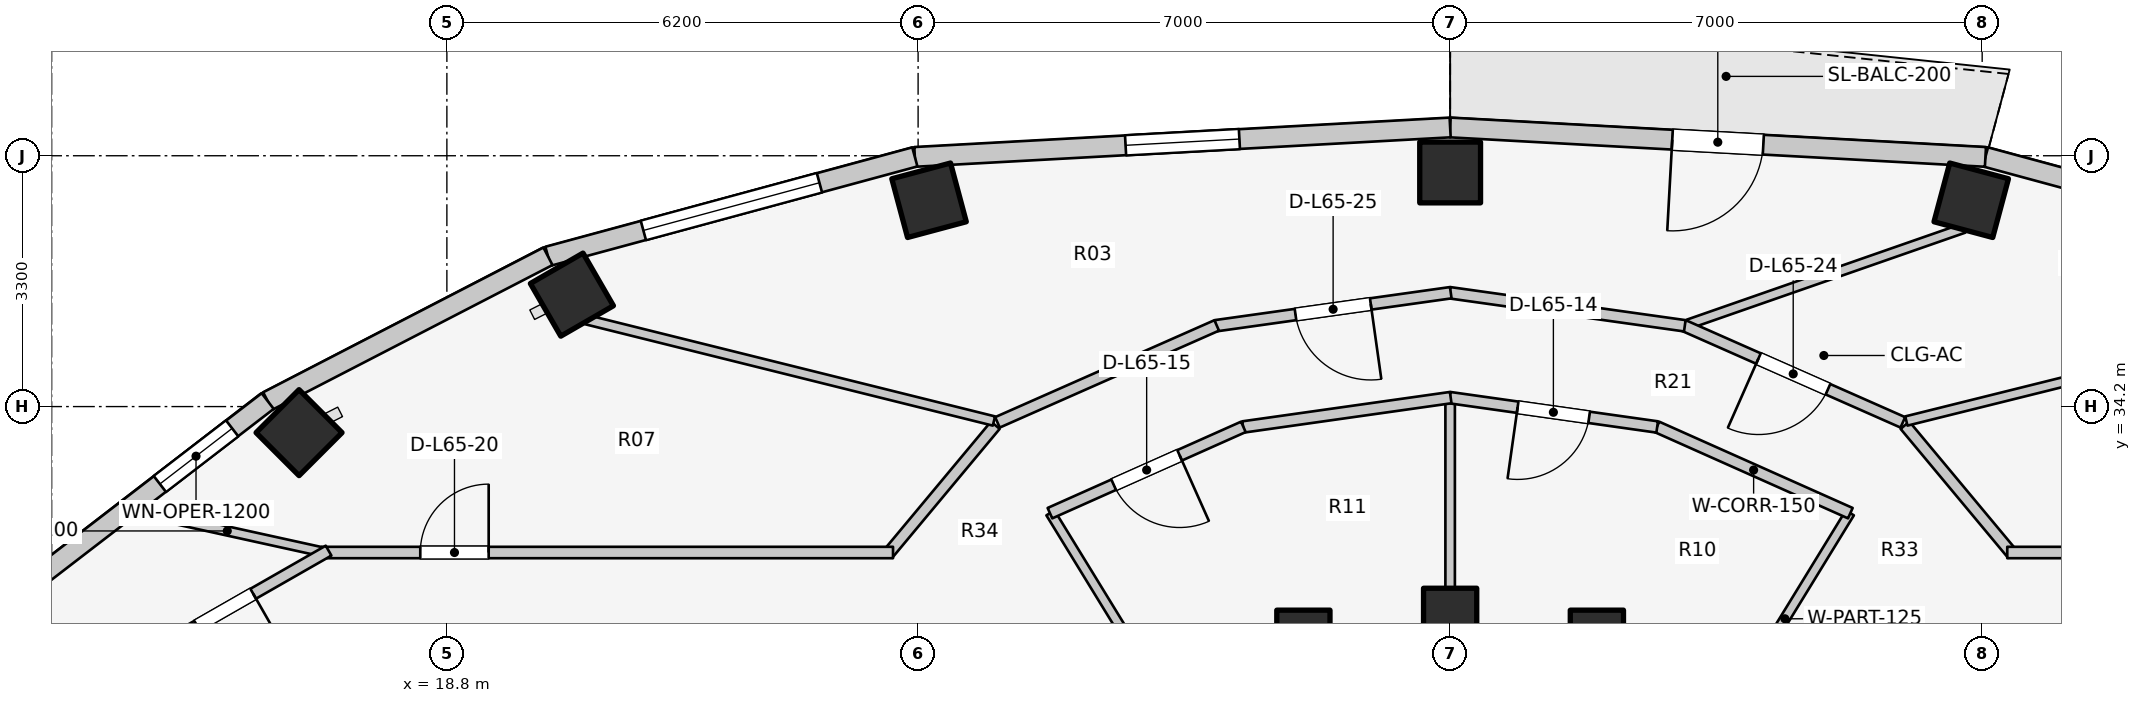
"""IFC4 building model, lengths in metres.
Left out: names, types, materials, properties, quantities, classifications, styles, units other than length and angle.
Written with IfcOpenShell. Run it as: python <this file> out.ifc"""

import sys

from ifc_helpers import new_model, si_unit, direction, frame, frame_2d, origin, origin_2d, place, context, subcontext, project, spatial, rectangle, extrude, element, fill, save


model = new_model("IFC4")
c1 = context("Model", 3, precision=1e-05, world=origin(), true_north=direction((0.0, 1.0)))
c2 = subcontext(c1, "Body", "Model", "MODEL_VIEW")
j1 = project(units=[si_unit("LENGTHUNIT", "METRE"), si_unit("PLANEANGLEUNIT", "RADIAN")], contexts=[c1])
p1 = place(None, origin())
s1 = spatial("IfcSite", under=j1, at=p1, CompositionType="ELEMENT")
p2 = place(p1, origin())
s2 = spatial("IfcBuilding", under=s1, at=p2, CompositionType="ELEMENT")
p3 = place(p2, frame((0.0, 0.0, 214.0)))
s3 = spatial("IfcBuildingStorey", under=s2, at=p3, CompositionType="ELEMENT", Elevation=214.0)
p4 = place(p3, frame((33.931, 31.172, 0.0), z_axis=(0.0, 0.0, 1.0), x_axis=(1.0, 0.0, 0.0)))
e1 = element("IfcColumn", 1, at=p4, inside=s3, PredefinedType="COLUMN", context=c2, shape_type="SweptSolid", body=[
    extrude(rectangle(XDim=0.7, YDim=0.7, at=origin_2d()), origin(), (0.0, 0.0, 1.0), 3.1),
])
p5 = place(p3, frame((38.856, 36.914, 0.0), z_axis=(0.0, 0.0, 1.0), x_axis=(0.258819045103, 0.965925826289, 0.0)))
e2 = element("IfcColumn", 2, at=p5, inside=s3, PredefinedType="COLUMN", context=c2, shape_type="SweptSolid", body=[
    extrude(rectangle(XDim=0.8, YDim=0.8, at=origin_2d()), origin(), (0.0, 0.0, 1.0), 3.1),
])
p6 = place(p3, frame((32.0, 31.46, 0.0), z_axis=(0.0, 0.0, 1.0), x_axis=(1.0, 0.0, 0.0)))
e3 = element("IfcColumn", 3, at=p6, inside=s3, PredefinedType="COLUMN", context=c2, shape_type="SweptSolid", body=[
    extrude(rectangle(XDim=0.7, YDim=0.7, at=origin_2d()), origin(), (0.0, 0.0, 1.0), 3.1),
])
p7 = place(p3, frame((32.0, 37.28, 0.0), z_axis=(0.0, 0.0, 1.0), x_axis=(0.0, 1.0, 0.0)))
e4 = element("IfcColumn", 4, at=p7, inside=s3, PredefinedType="COLUMN", context=c2, shape_type="SweptSolid", body=[
    extrude(rectangle(XDim=0.8, YDim=0.8, at=origin_2d()), origin(), (0.0, 0.0, 1.0), 3.1),
])
p8 = place(p3, frame((30.069, 31.172, 0.0), z_axis=(0.0, 0.0, 1.0), x_axis=(1.0, 0.0, 0.0)))
e5 = element("IfcColumn", 5, at=p8, inside=s3, PredefinedType="COLUMN", context=c2, shape_type="SweptSolid", body=[
    extrude(rectangle(XDim=0.7, YDim=0.7, at=origin_2d()), origin(), (0.0, 0.0, 1.0), 3.1),
])
for number, where, z_axis, x_axis in (
    (6, (25.144, 36.914, 0.0), (0.0, 0.0, 1.0), (-0.259, 0.966, 0.0)),
    (7, (20.445, 35.673, 0.0), (0.0, 0.0, 1.0), (-0.5, 0.866, 0.0)),
    (8, (16.855, 33.857, 0.0), (0.0, 0.0, 1.0), (-0.707, 0.707, 0.0)),
):
    element("IfcColumn", number, at=place(p3, frame(where, z_axis=z_axis, x_axis=x_axis)), inside=s3, PredefinedType="COLUMN", context=c2, shape_type="SweptSolid", body=[
        extrude(rectangle(XDim=0.8, YDim=0.8, at=origin_2d()), origin(), (0.0, 0.0, 1.0), 3.1),
    ])
p9 = place(p3, frame((43.87, 36.177, 0.0), z_axis=(0.0, 0.0, 1.0), x_axis=(-0.965213026382, 0.261464746576, 0.0)))
e9 = element("IfcWall", 9, at=p9, inside=s3, PredefinedType="STANDARD", context=c2, shape_type="SweptSolid", body=[
    extrude(rectangle(XDim=5.001, YDim=0.26, at=frame_2d((2.5, 0.0))), origin(), (0.0, 0.0, 1.0), 2.85),
])
p10 = place(p9, frame((1.301, 0.0, 0.75)))
e10 = element("IfcOpeningElement", 10, at=p10, cuts=e9, PredefinedType="OPENING", context=c2, shape_type="SweptSolid", body=[
    extrude(rectangle(XDim=2.4, YDim=1.7, at=frame_2d((1.2, 0.85))), frame((0.0, 0.14, 0.0), z_axis=(0.0, -1.0, 0.0), x_axis=(1.0, 0.0, 0.0)), (0.0, 0.0, 1.0), 0.28),
])
p11 = place(p3, frame((39.043, 37.485, 0.0), z_axis=(0.0, 0.0, 1.0), x_axis=(-0.998490239527, 0.054929423535, 0.0)))
e11 = element("IfcWall", 11, at=p11, inside=s3, PredefinedType="STANDARD", context=c2, shape_type="SweptSolid", body=[
    extrude(rectangle(XDim=7.054, YDim=0.26, at=frame_2d((3.527, 0.0))), origin(), (0.0, 0.0, 1.0), 2.88),
])
p12 = place(p11, frame((2.927, 0.0, 0.0)))
e12 = element("IfcOpeningElement", 12, at=p12, cuts=e11, PredefinedType="OPENING", context=c2, shape_type="SweptSolid", body=[
    extrude(rectangle(XDim=1.2, YDim=2.2, at=frame_2d((0.6, 1.1))), frame((0.0, 0.14, 0.0), z_axis=(0.0, -1.0, 0.0), x_axis=(1.0, 0.0, 0.0)), (0.0, 0.0, 1.0), 0.28),
])
p13 = place(p3, frame((32.0, 37.872, 0.0), z_axis=(0.0, 0.0, 1.0), x_axis=(-0.998490239527, -0.054929423535, 0.0)))
e13 = element("IfcWall", 13, at=p13, inside=s3, PredefinedType="STANDARD", context=c2, shape_type="SweptSolid", body=[
    extrude(rectangle(XDim=7.054, YDim=0.26, at=frame_2d((3.527, 0.0))), origin(), (0.0, 0.0, 1.0), 2.85),
])
p14 = place(p13, frame((2.777, 0.0, 0.75)))
e14 = element("IfcOpeningElement", 14, at=p14, cuts=e13, PredefinedType="OPENING", context=c2, shape_type="SweptSolid", body=[
    extrude(rectangle(XDim=1.5, YDim=1.6, at=frame_2d((0.75, 0.8))), frame((0.0, 0.14, 0.0), z_axis=(0.0, -1.0, 0.0), x_axis=(1.0, 0.0, 0.0)), (0.0, 0.0, 1.0), 0.28),
])
p15 = place(p3, frame((24.957, 37.485, 0.0), z_axis=(0.0, 0.0, 1.0), x_axis=(-0.965213026382, -0.261464746576, 0.0)))
e15 = element("IfcWall", 15, at=p15, inside=s3, PredefinedType="STANDARD", context=c2, shape_type="SweptSolid", body=[
    extrude(rectangle(XDim=5.001, YDim=0.26, at=frame_2d((2.5, 0.0))), origin(), (0.0, 0.0, 1.0), 2.85),
])
p16 = place(p15, frame((1.301, 0.0, 0.75)))
e16 = element("IfcOpeningElement", 16, at=p16, cuts=e15, PredefinedType="OPENING", context=c2, shape_type="SweptSolid", body=[
    extrude(rectangle(XDim=2.4, YDim=1.7, at=frame_2d((1.2, 0.85))), frame((0.0, 0.14, 0.0), z_axis=(0.0, -1.0, 0.0), x_axis=(1.0, 0.0, 0.0)), (0.0, 0.0, 1.0), 0.28),
])
p17 = place(p3, frame((20.13, 36.177, 0.0), z_axis=(0.0, 0.0, 1.0), x_axis=(-0.88849146803, -0.458893137057, 0.0)))
e17 = element("IfcWall", 17, at=p17, inside=s3, PredefinedType="STANDARD", context=c2, shape_type="SweptSolid", body=[
    extrude(rectangle(XDim=4.15, YDim=0.26, at=frame_2d((2.075, 0.0))), origin(), (0.0, 0.0, 1.0), 2.85),
])
p18 = place(p3, frame((16.442, 34.272, 0.0), z_axis=(0.0, 0.0, 1.0), x_axis=(-0.792713817907, -0.609593965603, 0.0)))
e18 = element("IfcWall", 18, at=p18, inside=s3, PredefinedType="STANDARD", context=c2, shape_type="SweptSolid", body=[
    extrude(rectangle(XDim=4.041, YDim=0.26, at=frame_2d((2.021, 0.0))), origin(), (0.0, 0.0, 1.0), 2.85),
])
p19 = place(p18, frame((0.589, 0.0, 0.75)))
e19 = element("IfcOpeningElement", 19, at=p19, cuts=e18, PredefinedType="OPENING", context=c2, shape_type="SweptSolid", body=[
    extrude(rectangle(XDim=1.2, YDim=1.5, at=frame_2d((0.6, 0.75))), frame((0.0, 0.14, 0.0), z_axis=(0.0, -1.0, 0.0), x_axis=(1.0, 0.0, 0.0)), (0.0, 0.0, 1.0), 0.28),
])
p20 = place(p3, frame((35.55, 30.015, 0.0), z_axis=(0.0, 0.0, 1.0), x_axis=(0.522763432117, 0.852477796802, 0.0)))
e20 = element("IfcWall", 20, at=p20, inside=s3, PredefinedType="PARTITIONING", context=c2, shape_type="SweptSolid", body=[
    extrude(rectangle(XDim=3.269, YDim=0.125, at=frame_2d((1.635, 0.0))), origin(), (0.0, 0.0, 1.0), 2.376),
])
p21 = place(p3, frame((32.0, 31.1, 0.0), z_axis=(0.0, 0.0, 1.0), x_axis=(0.0, 1.0, 0.0)))
e21 = element("IfcWall", 21, at=p21, inside=s3, PredefinedType="PARTITIONING", context=c2, shape_type="SweptSolid", body=[
    extrude(rectangle(XDim=3.218, YDim=0.125, at=frame_2d((1.609, 0.0))), origin(), (0.0, 0.0, 1.0), 2.376),
])
p22 = place(p3, frame((28.45, 30.015, 0.0), z_axis=(0.0, 0.0, 1.0), x_axis=(-0.522763432117, 0.852477796802, 0.0)))
e22 = element("IfcWall", 22, at=p22, inside=s3, PredefinedType="PARTITIONING", context=c2, shape_type="SweptSolid", body=[
    extrude(rectangle(XDim=3.269, YDim=0.125, at=frame_2d((1.635, 0.0))), origin(), (0.0, 0.0, 1.0), 2.376),
])
p23 = place(p3, frame((37.265, 32.798, 0.0), z_axis=(0.0, 0.0, 1.0), x_axis=(-0.913254317828, 0.407389924971, 0.0)))
e23 = element("IfcWall", 23, at=p23, inside=s3, PredefinedType="PARTITIONING", context=c2, shape_type="SweptSolid", body=[
    extrude(rectangle(XDim=2.787, YDim=0.15, at=frame_2d((1.393, 0.0))), origin(), (0.0, 0.0, 1.0), 2.376),
])
p24 = place(p3, frame((34.724, 33.932, 0.0), z_axis=(0.0, 0.0, 1.0), x_axis=(-0.990150268487, 0.140008734782, 0.0)))
e24 = element("IfcWall", 24, at=p24, inside=s3, PredefinedType="PARTITIONING", context=c2, shape_type="SweptSolid", body=[
    extrude(rectangle(XDim=2.759, YDim=0.15, at=frame_2d((1.379, 0.0))), origin(), (0.0, 0.0, 1.0), 2.376),
])
p25 = place(p24, frame((0.904, 0.0, 0.0)))
e25 = element("IfcOpeningElement", 25, at=p25, cuts=e24, PredefinedType="OPENING", context=c2, shape_type="SweptSolid", body=[
    extrude(rectangle(XDim=0.95, YDim=2.1, at=frame_2d((0.475, 1.05))), frame((0.0, 0.085, 0.0), z_axis=(0.0, -1.0, 0.0), x_axis=(1.0, 0.0, 0.0)), (0.0, 0.0, 1.0), 0.17),
])
p26 = place(p3, frame((32.007, 34.318, 0.0), z_axis=(0.0, 0.0, 1.0), x_axis=(-0.990150268487, -0.140008734782, 0.0)))
e26 = element("IfcWall", 26, at=p26, inside=s3, PredefinedType="PARTITIONING", context=c2, shape_type="SweptSolid", body=[
    extrude(rectangle(XDim=2.759, YDim=0.15, at=frame_2d((1.379, 0.0))), origin(), (0.0, 0.0, 1.0), 2.376),
])
p27 = place(p3, frame((29.28, 33.933, 0.0), z_axis=(0.0, 0.0, 1.0), x_axis=(-0.913254317828, -0.407389924971, 0.0)))
e27 = element("IfcWall", 27, at=p27, inside=s3, PredefinedType="PARTITIONING", context=c2, shape_type="SweptSolid", body=[
    extrude(rectangle(XDim=2.787, YDim=0.15, at=frame_2d((1.393, 0.0))), origin(), (0.0, 0.0, 1.0), 2.376),
])
p28 = place(p27, frame((0.918, 0.0, 0.0)))
e28 = element("IfcOpeningElement", 28, at=p28, cuts=e27, PredefinedType="OPENING", context=c2, shape_type="SweptSolid", body=[
    extrude(rectangle(XDim=0.95, YDim=2.1, at=frame_2d((0.475, 1.05))), frame((0.0, 0.085, 0.0), z_axis=(0.0, -1.0, 0.0), x_axis=(1.0, 0.0, 0.0)), (0.0, 0.0, 1.0), 0.17),
])
p29 = place(p3, frame((37.984, 33.955, 0.0), z_axis=(0.0, 0.0, 1.0), x_axis=(0.64030392053, -0.76812166312, 0.0)))
e29 = element("IfcWall", 29, at=p29, inside=s3, PredefinedType="PARTITIONING", context=c2, shape_type="SweptSolid", body=[
    extrude(rectangle(XDim=2.21, YDim=0.15, at=frame_2d((1.105, 0.0))), origin(), (0.0, 0.0, 1.0), 2.376),
])
p30 = place(p3, frame((39.33, 32.28, 0.0), z_axis=(0.0, 0.0, 1.0), x_axis=(1.0, 0.0, 0.0)))
e30 = element("IfcWall", 30, at=p30, inside=s3, PredefinedType="PARTITIONING", context=c2, shape_type="SweptSolid", body=[
    extrude(rectangle(XDim=7.52, YDim=0.15, at=frame_2d((3.76, 0.0))), origin(), (0.0, 0.0, 1.0), 2.376),
])
p31 = place(p30, frame((5.22, 0.0, 0.0)))
e31 = element("IfcOpeningElement", 31, at=p31, cuts=e30, PredefinedType="OPENING", context=c2, shape_type="SweptSolid", body=[
    extrude(rectangle(XDim=0.9, YDim=2.1, at=frame_2d((0.45, 1.05))), frame((0.0, 0.085, 0.0), z_axis=(0.0, -1.0, 0.0), x_axis=(1.0, 0.0, 0.0)), (0.0, 0.0, 1.0), 0.17),
])
p32 = place(p3, frame((17.249, 32.269, 0.0), z_axis=(0.0, 0.0, 1.0), x_axis=(-0.976641849477, 0.214873678823, 0.0)))
e32 = element("IfcWall", 32, at=p32, inside=s3, PredefinedType="MOVABLE", context=c2, shape_type="SweptSolid", body=[
    extrude(rectangle(XDim=2.74, YDim=0.12, at=frame_2d((1.37, 0.0))), origin(), (0.0, 0.0, 1.0), 2.22),
])
p33 = place(p3, frame((26.016, 33.955, 0.0), z_axis=(0.0, 0.0, 1.0), x_axis=(-0.64030392053, -0.76812166312, 0.0)))
e33 = element("IfcWall", 33, at=p33, inside=s3, PredefinedType="PARTITIONING", context=c2, shape_type="SweptSolid", body=[
    extrude(rectangle(XDim=2.21, YDim=0.15, at=frame_2d((1.105, 0.0))), origin(), (0.0, 0.0, 1.0), 2.376),
])
p34 = place(p3, frame((17.15, 32.28, 0.0), z_axis=(0.0, 0.0, 1.0), x_axis=(1.0, 0.0, 0.0)))
e34 = element("IfcWall", 34, at=p34, inside=s3, PredefinedType="PARTITIONING", context=c2, shape_type="SweptSolid", body=[
    extrude(rectangle(XDim=7.52, YDim=0.15, at=frame_2d((3.76, 0.0))), origin(), (0.0, 0.0, 1.0), 2.376),
])
p35 = place(p34, frame((1.3, 0.0, 0.0)))
e35 = element("IfcOpeningElement", 35, at=p35, cuts=e34, PredefinedType="OPENING", context=c2, shape_type="SweptSolid", body=[
    extrude(rectangle(XDim=0.9, YDim=2.1, at=frame_2d((0.45, 1.05))), frame((0.0, 0.085, 0.0), z_axis=(0.0, -1.0, 0.0), x_axis=(1.0, 0.0, 0.0)), (0.0, 0.0, 1.0), 0.17),
])
p36 = place(p3, frame((17.243, 32.305, 0.0), z_axis=(0.0, 0.0, 1.0), x_axis=(-0.867991349648, -0.496579315857, 0.0)))
e36 = element("IfcWall", 36, at=p36, inside=s3, PredefinedType="PARTITIONING", context=c2, shape_type="SweptSolid", body=[
    extrude(rectangle(XDim=2.567, YDim=0.15, at=frame_2d((1.283, 0.0))), origin(), (0.0, 0.0, 1.0), 2.22),
])
p37 = place(p36, frame((1.143, 0.0, 0.0)))
e37 = element("IfcOpeningElement", 37, at=p37, cuts=e36, PredefinedType="OPENING", context=c2, shape_type="SweptSolid", body=[
    extrude(rectangle(XDim=0.85, YDim=2.05, at=frame_2d((0.425, 1.025))), frame((0.0, 0.085, 0.0), z_axis=(0.0, -1.0, 0.0), x_axis=(1.0, 0.0, 0.0)), (0.0, 0.0, 1.0), 0.17),
])
p38 = place(p3, frame((38.002, 34.01, 0.0), z_axis=(0.0, 0.0, 1.0), x_axis=(0.970445810114, 0.241319144769, 0.0)))
e38 = element("IfcWall", 38, at=p38, inside=s3, PredefinedType="PARTITIONING", context=c2, shape_type="SweptSolid", body=[
    extrude(rectangle(XDim=5.526, YDim=0.125, at=frame_2d((2.763, 0.0))), origin(), (0.0, 0.0, 1.0), 2.376),
])
p39 = place(p3, frame((35.131, 35.283, 0.0), z_axis=(0.0, 0.0, 1.0), x_axis=(0.944311395416, 0.329053169697, 0.0)))
e39 = element("IfcWall", 39, at=p39, inside=s3, PredefinedType="PARTITIONING", context=c2, shape_type="SweptSolid", body=[
    extrude(rectangle(XDim=3.84, YDim=0.125, at=frame_2d((1.92, 0.0))), origin(), (0.0, 0.0, 1.0), 2.376),
])
p40 = place(p3, frame((25.998, 34.01, 0.0), z_axis=(0.0, 0.0, 1.0), x_axis=(-0.970445810114, 0.241319144769, 0.0)))
e40 = element("IfcWall", 40, at=p40, inside=s3, PredefinedType="PARTITIONING", context=c2, shape_type="SweptSolid", body=[
    extrude(rectangle(XDim=5.526, YDim=0.125, at=frame_2d((2.763, 0.0))), origin(), (0.0, 0.0, 1.0), 2.376),
])
p41 = place(p3, frame((37.956, 33.992, 0.0), z_axis=(0.0, 0.0, 1.0), x_axis=(-0.914642679993, 0.404263240891, 0.0)))
e41 = element("IfcWall", 41, at=p41, inside=s3, PredefinedType="PARTITIONING", context=c2, shape_type="SweptSolid", body=[
    extrude(rectangle(XDim=3.154, YDim=0.15, at=frame_2d((1.577, 0.0))), origin(), (0.0, 0.0, 1.0), 2.376),
])
p42 = place(p41, frame((1.077, 0.0, 0.0)))
e42 = element("IfcOpeningElement", 42, at=p42, cuts=e41, PredefinedType="OPENING", context=c2, shape_type="SweptSolid", body=[
    extrude(rectangle(XDim=1.0, YDim=2.1, at=frame_2d((0.5, 1.05))), frame((0.0, 0.085, 0.0), z_axis=(0.0, -1.0, 0.0), x_axis=(1.0, 0.0, 0.0)), (0.0, 0.0, 1.0), 0.17),
])
p43 = place(p3, frame((35.087, 35.263, 0.0), z_axis=(0.0, 0.0, 1.0), x_axis=(-0.990268690673, 0.139168675614, 0.0)))
e43 = element("IfcWall", 43, at=p43, inside=s3, PredefinedType="PARTITIONING", context=c2, shape_type="SweptSolid", body=[
    extrude(rectangle(XDim=3.126, YDim=0.15, at=frame_2d((1.563, 0.0))), origin(), (0.0, 0.0, 1.0), 2.376),
])
p44 = place(p3, frame((32.008, 35.698, 0.0), z_axis=(0.0, 0.0, 1.0), x_axis=(-0.990268690673, -0.139168675614, 0.0)))
e44 = element("IfcWall", 44, at=p44, inside=s3, PredefinedType="PARTITIONING", context=c2, shape_type="SweptSolid", body=[
    extrude(rectangle(XDim=3.126, YDim=0.15, at=frame_2d((1.563, 0.0))), origin(), (0.0, 0.0, 1.0), 2.376),
])
p45 = place(p44, frame((1.063, 0.0, 0.0)))
e45 = element("IfcOpeningElement", 45, at=p45, cuts=e44, PredefinedType="OPENING", context=c2, shape_type="SweptSolid", body=[
    extrude(rectangle(XDim=1.0, YDim=2.1, at=frame_2d((0.5, 1.05))), frame((0.0, 0.085, 0.0), z_axis=(0.0, -1.0, 0.0), x_axis=(1.0, 0.0, 0.0)), (0.0, 0.0, 1.0), 0.17),
])
p46 = place(p3, frame((28.929, 35.268, 0.0), z_axis=(0.0, 0.0, 1.0), x_axis=(-0.914642679993, -0.404263240891, 0.0)))
e46 = element("IfcWall", 46, at=p46, inside=s3, PredefinedType="PARTITIONING", context=c2, shape_type="SweptSolid", body=[
    extrude(rectangle(XDim=3.154, YDim=0.15, at=frame_2d((1.577, 0.0))), origin(), (0.0, 0.0, 1.0), 2.376),
])
p47 = place(p12, origin())
e47 = element("IfcDoor", 47, at=p47, inside=s3, OperationType="SINGLE_SWING_RIGHT", PredefinedType="DOOR", context=c2, shape_type="SweptSolid", body=[
    extrude(rectangle(XDim=1.2, YDim=2.2, at=frame_2d((0.6, 1.1))), frame((0.0, 0.025, 0.0), z_axis=(0.0, -1.0, 0.0), x_axis=(1.0, 0.0, 0.0)), (0.0, 0.0, 1.0), 0.05),
])
fill(e12, e47)
p48 = place(p14, origin())
e48 = element("IfcWindow", 48, at=p48, inside=s3, PartitioningType="SINGLE_PANEL", PredefinedType="WINDOW", context=c2, shape_type="SweptSolid", body=[
    extrude(rectangle(XDim=1.5, YDim=1.6, at=frame_2d((0.75, 0.8))), frame((0.0, 0.03, 0.0), z_axis=(0.0, -1.0, 0.0), x_axis=(1.0, 0.0, 0.0)), (0.0, 0.0, 1.0), 0.06),
])
fill(e14, e48)
p49 = place(p16, origin())
e49 = element("IfcWindow", 49, at=p49, inside=s3, PartitioningType="SINGLE_PANEL", PredefinedType="WINDOW", context=c2, shape_type="SweptSolid", body=[
    extrude(rectangle(XDim=2.4, YDim=1.7, at=frame_2d((1.2, 0.85))), frame((0.0, 0.03, 0.0), z_axis=(0.0, -1.0, 0.0), x_axis=(1.0, 0.0, 0.0)), (0.0, 0.0, 1.0), 0.06),
])
fill(e16, e49)
p50 = place(p19, origin())
e50 = element("IfcWindow", 50, at=p50, inside=s3, PartitioningType="SINGLE_PANEL", PredefinedType="WINDOW", context=c2, shape_type="SweptSolid", body=[
    extrude(rectangle(XDim=1.2, YDim=1.5, at=frame_2d((0.6, 0.75))), frame((0.0, 0.03, 0.0), z_axis=(0.0, -1.0, 0.0), x_axis=(1.0, 0.0, 0.0)), (0.0, 0.0, 1.0), 0.06),
])
fill(e19, e50)
p51 = place(p25, origin())
e51 = element("IfcDoor", 51, at=p51, inside=s3, OperationType="SINGLE_SWING_RIGHT", PredefinedType="DOOR", context=c2, shape_type="SweptSolid", body=[
    extrude(rectangle(XDim=0.95, YDim=2.1, at=frame_2d((0.475, 1.05))), frame((0.0, 0.025, 0.0), z_axis=(0.0, -1.0, 0.0), x_axis=(1.0, 0.0, 0.0)), (0.0, 0.0, 1.0), 0.05),
])
fill(e25, e51)
p52 = place(p28, origin())
e52 = element("IfcDoor", 52, at=p52, inside=s3, OperationType="SINGLE_SWING_LEFT", PredefinedType="DOOR", context=c2, shape_type="SweptSolid", body=[
    extrude(rectangle(XDim=0.95, YDim=2.1, at=frame_2d((0.475, 1.05))), frame((0.0, 0.025, 0.0), z_axis=(0.0, -1.0, 0.0), x_axis=(1.0, 0.0, 0.0)), (0.0, 0.0, 1.0), 0.05),
])
fill(e28, e52)
p53 = place(p35, origin())
e53 = element("IfcDoor", 53, at=p53, inside=s3, OperationType="SINGLE_SWING_RIGHT", PredefinedType="DOOR", context=c2, shape_type="SweptSolid", body=[
    extrude(rectangle(XDim=0.9, YDim=2.1, at=frame_2d((0.45, 1.05))), frame((0.0, 0.025, 0.0), z_axis=(0.0, -1.0, 0.0), x_axis=(1.0, 0.0, 0.0)), (0.0, 0.0, 1.0), 0.05),
])
fill(e35, e53)
p54 = place(p37, origin())
e54 = element("IfcDoor", 54, at=p54, inside=s3, OperationType="SINGLE_SWING_LEFT", PredefinedType="DOOR", context=c2, shape_type="SweptSolid", body=[
    extrude(rectangle(XDim=0.85, YDim=2.05, at=frame_2d((0.425, 1.025))), frame((0.0, 0.025, 0.0), z_axis=(0.0, -1.0, 0.0), x_axis=(1.0, 0.0, 0.0)), (0.0, 0.0, 1.0), 0.05),
])
fill(e37, e54)
p55 = place(p42, origin())
e55 = element("IfcDoor", 55, at=p55, inside=s3, OperationType="SINGLE_SWING_RIGHT", PredefinedType="DOOR", context=c2, shape_type="SweptSolid", body=[
    extrude(rectangle(XDim=1.0, YDim=2.1, at=frame_2d((0.5, 1.05))), frame((0.0, 0.025, 0.0), z_axis=(0.0, -1.0, 0.0), x_axis=(1.0, 0.0, 0.0)), (0.0, 0.0, 1.0), 0.05),
])
fill(e42, e55)
p56 = place(p45, origin())
e56 = element("IfcDoor", 56, at=p56, inside=s3, OperationType="SINGLE_SWING_LEFT", PredefinedType="DOOR", context=c2, shape_type="SweptSolid", body=[
    extrude(rectangle(XDim=1.0, YDim=2.1, at=frame_2d((0.5, 1.05))), frame((0.0, 0.025, 0.0), z_axis=(0.0, -1.0, 0.0), x_axis=(1.0, 0.0, 0.0)), (0.0, 0.0, 1.0), 0.05),
])
fill(e45, e56)
save(model, sys.argv[1])
